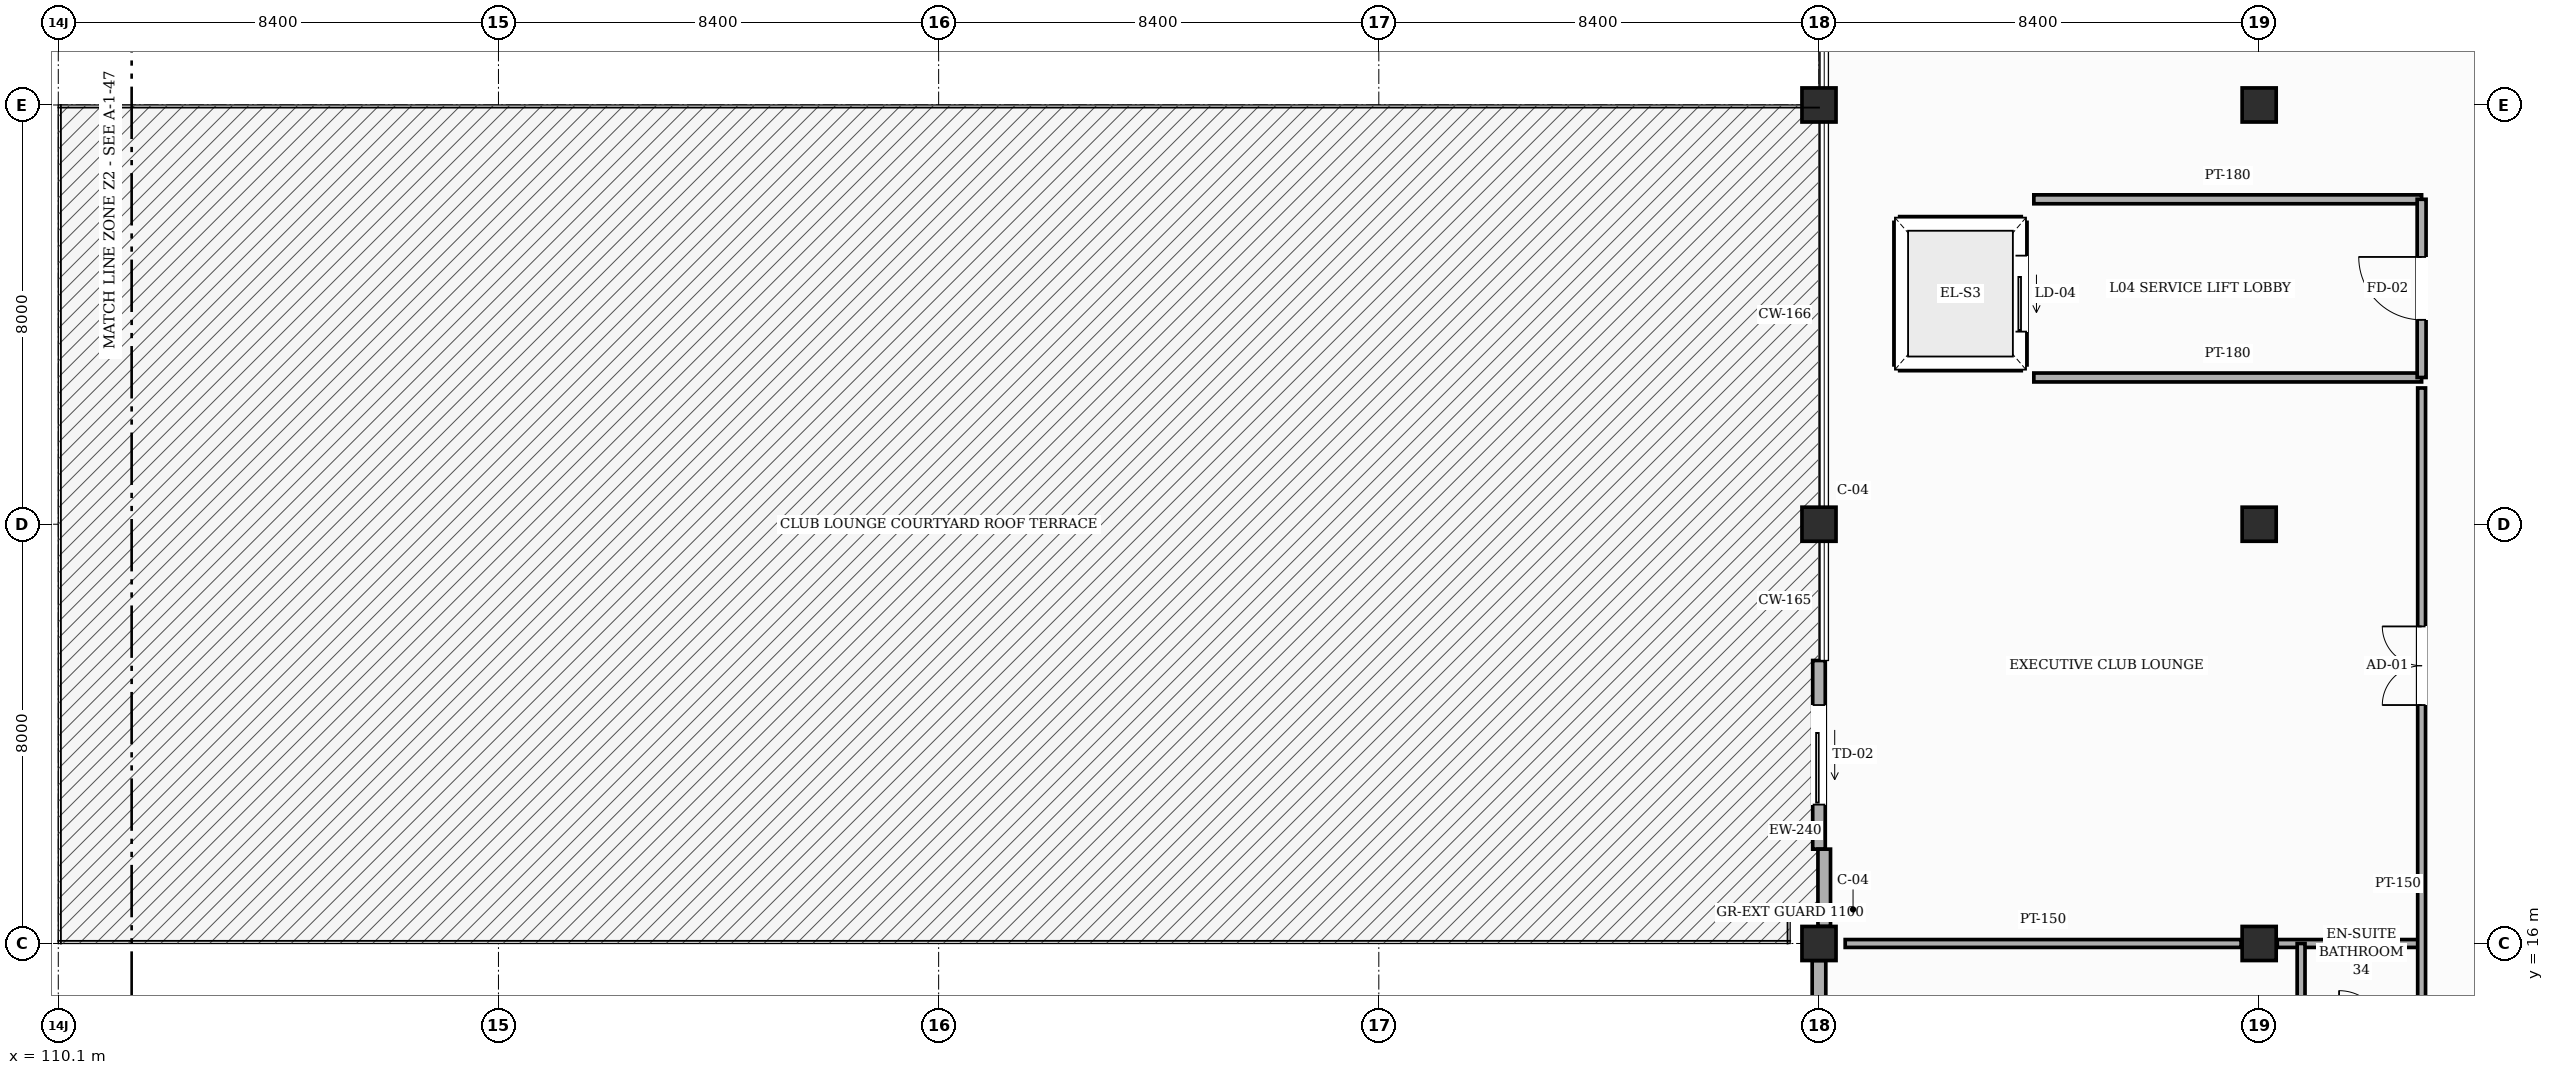
"""IFC4 building model, lengths in metres.
Left out: names, types, materials, properties, quantities, classifications, styles, units other than length and angle.
Written with IfcOpenShell. Run it as: python <this file> out.ifc"""

import sys

from ifc_helpers import new_model, si_unit, direction, frame, frame_2d, origin, origin_2d, place, context, subcontext, project, spatial, rectangle, hollow_rectangle, extrude, element, fill, save


model = new_model("IFC4")
c1 = context("Model", 3, precision=1e-05, world=origin(), true_north=direction((0.0, 1.0)))
c2 = subcontext(c1, "Body", "Model", "MODEL_VIEW")
j1 = project(units=[si_unit("LENGTHUNIT", "METRE"), si_unit("PLANEANGLEUNIT", "RADIAN")], contexts=[c1])
p1 = place(None, origin())
s1 = spatial("IfcSite", under=j1, at=p1, CompositionType="ELEMENT")
p2 = place(p1, origin())
s2 = spatial("IfcBuilding", under=s1, at=p2, CompositionType="ELEMENT")
p3 = place(p2, frame((0.0, 0.0, 19.8)))
s3 = spatial("IfcBuildingStorey", under=s2, at=p3, CompositionType="ELEMENT", Elevation=19.8)
for number, where, z_axis, x_axis in (
    (1, (143.7, 16.0, 0.0), (0.0, 0.0, 1.0), (1.0, 0.0, 0.0)),
    (2, (143.7, 24.0, 0.0), (0.0, 0.0, 1.0), (1.0, 0.0, 0.0)),
    (3, (143.7, 32.0, 0.0), (0.0, 0.0, 1.0), (1.0, 0.0, 0.0)),
    (4, (152.1, 16.0, 0.0), (0.0, 0.0, 1.0), (1.0, 0.0, 0.0)),
):
    element("IfcColumn", number, at=place(p3, frame(where, z_axis=z_axis, x_axis=x_axis)), inside=s3, PredefinedType="COLUMN", context=c2, shape_type="SweptSolid", body=[
        extrude(hollow_rectangle(XDim=0.65, YDim=0.65, WallThickness=0.025, InnerFilletRadius=0.025, OuterFilletRadius=0.05, at=origin_2d()), origin(), (0.0, 0.0, 1.0), 4.8),
    ])
for number, where, z_axis, x_axis in (
    (5, (152.1, 24.0, -0.24), (0.0, 0.0, 1.0), (1.0, 0.0, 0.0)),
    (6, (152.1, 32.0, -0.24), (0.0, 0.0, 1.0), (1.0, 0.0, 0.0)),
):
    element("IfcColumn", number, at=place(p3, frame(where, z_axis=z_axis, x_axis=x_axis)), inside=s3, PredefinedType="COLUMN", context=c2, shape_type="SweptSolid", body=[
        extrude(hollow_rectangle(XDim=0.65, YDim=0.65, WallThickness=0.025, InnerFilletRadius=0.025, OuterFilletRadius=0.05, at=origin_2d()), origin(), (0.0, 0.0, 1.0), 5.04),
    ])
p4 = place(p3, frame((143.7, 8.325, 0.0), z_axis=(0.0, 0.0, 1.0), x_axis=(0.0, 1.0, 0.0)))
e7 = element("IfcWall", 7, at=p4, inside=s3, PredefinedType="SOLIDWALL", context=c2, shape_type="SweptSolid", body=[
    extrude(rectangle(XDim=7.35, YDim=0.26, at=frame_2d((3.675, 0.0))), origin(), (0.0, 0.0, 1.0), 4.005),
])
p5 = place(p4, frame((1.225, 0.0, 0.85)))
e8 = element("IfcOpeningElement", 8, at=p5, cuts=e7, PredefinedType="OPENING", context=c2, shape_type="SweptSolid", body=[
    extrude(rectangle(XDim=1.65, YDim=1.95, at=frame_2d((0.825, 0.975))), frame((0.0, 0.14, 0.0), z_axis=(0.0, -1.0, 0.0), x_axis=(1.0, 0.0, 0.0)), (0.0, 0.0, 1.0), 0.28),
])
p6 = place(p4, frame((4.715, 0.0, 0.85)))
e9 = element("IfcOpeningElement", 9, at=p6, cuts=e7, PredefinedType="OPENING", context=c2, shape_type="SweptSolid", body=[
    extrude(rectangle(XDim=1.85, YDim=1.95, at=frame_2d((0.925, 0.975))), frame((0.0, 0.14, 0.0), z_axis=(0.0, -1.0, 0.0), x_axis=(1.0, 0.0, 0.0)), (0.0, 0.0, 1.0), 0.28),
])
p7 = place(p3, frame((143.7, 17.8, 0.0), z_axis=(0.0, 0.0, 1.0), x_axis=(0.0, 1.0, 0.0)))
e10 = element("IfcWall", 10, at=p7, inside=s3, PredefinedType="SOLIDWALL", context=c2, shape_type="SweptSolid", body=[
    extrude(rectangle(XDim=3.6, YDim=0.24, at=frame_2d((1.8, 0.0))), origin(), (0.0, 0.0, 1.0), 4.005),
])
p8 = place(p7, frame((0.85, 0.0, 0.0)))
e11 = element("IfcOpeningElement", 11, at=p8, cuts=e10, PredefinedType="OPENING", context=c2, shape_type="SweptSolid", body=[
    extrude(rectangle(XDim=1.9, YDim=2.35, at=frame_2d((0.95, 1.175))), frame((0.0, 0.13, 0.0), z_axis=(0.0, -1.0, 0.0), x_axis=(1.0, 0.0, 0.0)), (0.0, 0.0, 1.0), 0.26),
])
p9 = place(p3, frame((143.8, 16.325, 0.0), z_axis=(0.0, 0.0, 1.0), x_axis=(0.0, 1.0, 0.0)))
e12 = element("IfcWall", 12, at=p9, inside=s3, PredefinedType="SOLIDWALL", context=c2, shape_type="SweptSolid", body=[
    extrude(rectangle(XDim=1.475, YDim=0.24, at=frame_2d((0.738, 0.0))), origin(), (0.0, 0.0, 1.0), 4.005),
])
for number, where, z_axis, x_axis in (
    (13, (145.24, 29.76, 0.0), (0.0, 0.0, 1.0), (1.0, 0.0, 0.0)),
    (14, (145.24, 27.04, 0.0), (0.0, 0.0, 1.0), (1.0, 0.0, 0.0)),
):
    element("IfcWall", number, at=place(p3, frame(where, z_axis=z_axis, x_axis=x_axis)), inside=s3, PredefinedType="SHEAR", context=c2, shape_type="SweptSolid", body=[
        extrude(rectangle(XDim=2.32, YDim=0.22, at=frame_2d((1.16, 0.0))), origin(), (0.0, 0.0, 1.0), 4.58),
    ])
p10 = place(p3, frame((147.56, 27.04, 0.0), z_axis=(0.0, 0.0, 1.0), x_axis=(0.0, 1.0, 0.0)))
e15 = element("IfcWall", 15, at=p10, inside=s3, PredefinedType="SHEAR", context=c2, shape_type="SweptSolid", body=[
    extrude(rectangle(XDim=2.72, YDim=0.22, at=frame_2d((1.36, 0.0))), origin(), (0.0, 0.0, 1.0), 4.58),
])
p11 = place(p10, frame((0.635, 0.0, 0.0)))
e16 = element("IfcOpeningElement", 16, at=p11, cuts=e15, PredefinedType="OPENING", context=c2, shape_type="SweptSolid", body=[
    extrude(rectangle(XDim=1.45, YDim=2.35, at=frame_2d((0.725, 1.175))), frame((0.0, 0.12, 0.0), z_axis=(0.0, -1.0, 0.0), x_axis=(1.0, 0.0, 0.0)), (0.0, 0.0, 1.0), 0.24),
])
p12 = place(p3, frame((145.24, 27.04, 0.0), z_axis=(0.0, 0.0, 1.0), x_axis=(0.0, 1.0, 0.0)))
e17 = element("IfcWall", 17, at=p12, inside=s3, PredefinedType="SHEAR", context=c2, shape_type="SweptSolid", body=[
    extrude(rectangle(XDim=2.72, YDim=0.22, at=frame_2d((1.36, 0.0))), origin(), (0.0, 0.0, 1.0), 4.58),
])
p13 = place(p3, frame((144.2, 16.0, 0.0), z_axis=(0.0, 0.0, 1.0), x_axis=(1.0, 0.0, 0.0)))
e18 = element("IfcWall", 18, at=p13, inside=s3, PredefinedType="PARTITIONING", context=c2, shape_type="SweptSolid", body=[
    extrude(rectangle(XDim=7.555, YDim=0.15, at=frame_2d((3.777, 0.0))), origin(), (0.0, 0.0, 1.0), 3.905),
])
p14 = place(p3, frame((152.445, 16.0, 0.0), z_axis=(0.0, 0.0, 1.0), x_axis=(1.0, 0.0, 0.0)))
e19 = element("IfcWall", 19, at=p14, inside=s3, PredefinedType="PARTITIONING", context=c2, shape_type="SweptSolid", body=[
    extrude(rectangle(XDim=2.755, YDim=0.15, at=frame_2d((1.377, 0.0))), origin(), (0.0, 0.0, 1.0), 3.905),
])
for number, where, z_axis, x_axis in (
    (20, (147.8, 26.8, 0.0), (0.0, 0.0, 1.0), (1.0, 0.0, 0.0)),
    (21, (147.8, 30.2, 0.0), (0.0, 0.0, 1.0), (1.0, 0.0, 0.0)),
):
    element("IfcWall", number, at=place(p3, frame(where, z_axis=z_axis, x_axis=x_axis)), inside=s3, PredefinedType="PARTITIONING", context=c2, shape_type="SweptSolid", body=[
        extrude(rectangle(XDim=7.4, YDim=0.17, at=frame_2d((3.7, 0.0))), origin(), (0.0, 0.0, 1.0), 4.565),
    ])
p15 = place(p3, frame((152.9, 14.25, 0.0), z_axis=(0.0, 0.0, 1.0), x_axis=(0.0, 1.0, 0.0)))
e22 = element("IfcWall", 22, at=p15, inside=s3, PredefinedType="PARTITIONING", context=c2, shape_type="SweptSolid", body=[
    extrude(rectangle(XDim=1.75, YDim=0.15, at=frame_2d((0.875, 0.0))), origin(), (0.0, 0.0, 1.0), 4.565),
])
p16 = place(p3, frame((155.2, 1.0, 0.0), z_axis=(0.0, 0.0, 1.0), x_axis=(0.0, 1.0, 0.0)))
e23 = element("IfcWall", 23, at=p16, inside=s3, PredefinedType="PARTITIONING", context=c2, shape_type="SweptSolid", body=[
    extrude(rectangle(XDim=25.6, YDim=0.15, at=frame_2d((12.8, 0.0))), origin(), (0.0, 0.0, 1.0), 4.565),
])
p17 = place(p16, frame((19.55, 0.0, 0.0)))
e24 = element("IfcOpeningElement", 24, at=p17, cuts=e23, PredefinedType="OPENING", context=c2, shape_type="SweptSolid", body=[
    extrude(rectangle(XDim=1.5, YDim=2.3, at=frame_2d((0.75, 1.15))), frame((0.0, 0.085, 0.0), z_axis=(0.0, -1.0, 0.0), x_axis=(1.0, 0.0, 0.0)), (0.0, 0.0, 1.0), 0.17),
])
p18 = place(p16, frame((0.45, 0.0, 0.0)))
e25 = element("IfcOpeningElement", 25, at=p18, cuts=e23, PredefinedType="OPENING", context=c2, shape_type="SweptSolid", body=[
    extrude(rectangle(XDim=1.1, YDim=2.2, at=frame_2d((0.55, 1.1))), frame((0.0, 0.085, 0.0), z_axis=(0.0, -1.0, 0.0), x_axis=(1.0, 0.0, 0.0)), (0.0, 0.0, 1.0), 0.17),
])
p19 = place(p16, frame((4.275, 0.0, 0.0)))
e26 = element("IfcOpeningElement", 26, at=p19, cuts=e23, PredefinedType="OPENING", context=c2, shape_type="SweptSolid", body=[
    extrude(rectangle(XDim=0.95, YDim=2.15, at=frame_2d((0.475, 1.075))), frame((0.0, 0.085, 0.0), z_axis=(0.0, -1.0, 0.0), x_axis=(1.0, 0.0, 0.0)), (0.0, 0.0, 1.0), 0.17),
])
p20 = place(p16, frame((8.025, 0.0, 0.0)))
e27 = element("IfcOpeningElement", 27, at=p20, cuts=e23, PredefinedType="OPENING", context=c2, shape_type="SweptSolid", body=[
    extrude(rectangle(XDim=0.95, YDim=2.15, at=frame_2d((0.475, 1.075))), frame((0.0, 0.085, 0.0), z_axis=(0.0, -1.0, 0.0), x_axis=(1.0, 0.0, 0.0)), (0.0, 0.0, 1.0), 0.17),
])
p21 = place(p16, frame((11.775, 0.0, 0.0)))
e28 = element("IfcOpeningElement", 28, at=p21, cuts=e23, PredefinedType="OPENING", context=c2, shape_type="SweptSolid", body=[
    extrude(rectangle(XDim=0.95, YDim=2.15, at=frame_2d((0.475, 1.075))), frame((0.0, 0.085, 0.0), z_axis=(0.0, -1.0, 0.0), x_axis=(1.0, 0.0, 0.0)), (0.0, 0.0, 1.0), 0.17),
])
p22 = place(p3, frame((155.2, 26.8, 0.0), z_axis=(0.0, 0.0, 1.0), x_axis=(0.0, 1.0, 0.0)))
e29 = element("IfcWall", 29, at=p22, inside=s3, PredefinedType="PARTITIONING", context=c2, shape_type="SweptSolid", body=[
    extrude(rectangle(XDim=3.4, YDim=0.17, at=frame_2d((1.7, 0.0))), origin(), (0.0, 0.0, 1.0), 4.565),
])
p23 = place(p22, frame((1.1, 0.0, 0.0)))
e30 = element("IfcOpeningElement", 30, at=p23, cuts=e29, PredefinedType="OPENING", context=c2, shape_type="SweptSolid", body=[
    extrude(rectangle(XDim=1.2, YDim=2.2, at=frame_2d((0.6, 1.1))), frame((0.0, 0.095, 0.0), z_axis=(0.0, -1.0, 0.0), x_axis=(1.0, 0.0, 0.0)), (0.0, 0.0, 1.0), 0.19),
])
p24 = place(p8, origin())
e31 = element("IfcDoor", 31, at=p24, inside=s3, OperationType="SLIDING_TO_LEFT", PredefinedType="DOOR", context=c2, shape_type="SweptSolid", body=[
    extrude(rectangle(XDim=1.9, YDim=2.35, at=frame_2d((0.95, 1.175))), frame((0.0, 0.025, 0.0), z_axis=(0.0, -1.0, 0.0), x_axis=(1.0, 0.0, 0.0)), (0.0, 0.0, 1.0), 0.05),
])
fill(e11, e31)
p25 = place(p11, origin())
e32 = element("IfcDoor", 32, at=p25, inside=s3, OperationType="SLIDING_TO_LEFT", PredefinedType="DOOR", context=c2, shape_type="SweptSolid", body=[
    extrude(rectangle(XDim=1.45, YDim=2.35, at=frame_2d((0.725, 1.175))), frame((0.0, 0.025, 0.0), z_axis=(0.0, -1.0, 0.0), x_axis=(1.0, 0.0, 0.0)), (0.0, 0.0, 1.0), 0.05),
])
fill(e16, e32)
p26 = place(p23, origin())
e33 = element("IfcDoor", 33, at=p26, inside=s3, OperationType="SINGLE_SWING_RIGHT", PredefinedType="DOOR", context=c2, shape_type="SweptSolid", body=[
    extrude(rectangle(XDim=1.2, YDim=2.2, at=frame_2d((0.6, 1.1))), frame((0.0, 0.025, 0.0), z_axis=(0.0, -1.0, 0.0), x_axis=(1.0, 0.0, 0.0)), (0.0, 0.0, 1.0), 0.05),
])
fill(e30, e33)
p27 = place(p17, origin())
e34 = element("IfcDoor", 34, at=p27, inside=s3, OperationType="DOUBLE_DOOR_SINGLE_SWING", PredefinedType="DOOR", context=c2, shape_type="SweptSolid", body=[
    extrude(rectangle(XDim=1.5, YDim=2.3, at=frame_2d((0.75, 1.15))), frame((0.0, 0.025, 0.0), z_axis=(0.0, -1.0, 0.0), x_axis=(1.0, 0.0, 0.0)), (0.0, 0.0, 1.0), 0.05),
])
fill(e24, e34)
save(model, sys.argv[1])
